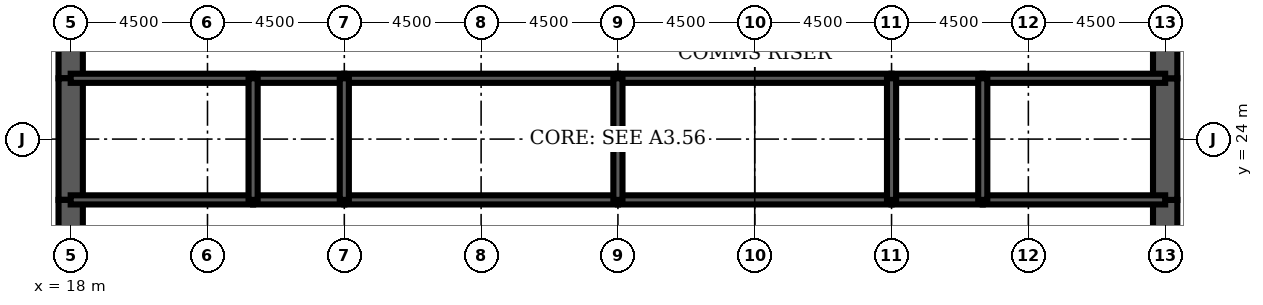
"""IFC4 building model, lengths in metres.
Left out: names, types, materials, properties, quantities, classifications, styles, units other than length and angle.
Written with IfcOpenShell. Run it as: python <this file> out.ifc"""

import sys

from ifc_helpers import new_model, si_unit, direction, frame, frame_2d, origin, place, context, subcontext, project, spatial, rectangle, extrude, element, fill, save


model = new_model("IFC4")
c1 = context("Model", 3, precision=1e-05, world=origin(), true_north=direction((0.0, 1.0)))
c2 = subcontext(c1, "Body", "Model", "MODEL_VIEW")
j1 = project(units=[si_unit("LENGTHUNIT", "METRE"), si_unit("PLANEANGLEUNIT", "RADIAN")], contexts=[c1])
p1 = place(None, origin())
s1 = spatial("IfcSite", under=j1, at=p1, CompositionType="ELEMENT")
p2 = place(p1, origin())
s2 = spatial("IfcBuilding", under=s1, at=p2, CompositionType="ELEMENT")
p3 = place(p2, frame((0.0, 0.0, 240.4)))
s3 = spatial("IfcBuildingStorey", under=s2, at=p3, CompositionType="ELEMENT", Elevation=240.4)
p4 = place(p3, frame((18.0, 28.8, 0.0), z_axis=(0.0, 0.0, 1.0), x_axis=(0.0, -1.0, 0.0)))
e1 = element("IfcWall", 1, at=p4, inside=s3, PredefinedType="SHEAR", context=c2, shape_type="SweptSolid", body=[
    extrude(rectangle(XDim=2.8, YDim=0.8, at=frame_2d((1.4, 0.0))), origin(), (0.0, 0.0, 1.0), 4.2),
])
p5 = place(p4, frame((0.4, 0.0, 0.0)))
e2 = element("IfcOpeningElement", 2, at=p5, cuts=e1, PredefinedType="OPENING", context=c2, shape_type="SweptSolid", body=[
    extrude(rectangle(XDim=1.8, YDim=2.1, at=frame_2d((0.9, 1.05))), frame((0.0, 0.41, 0.0), z_axis=(0.0, -1.0, 0.0), x_axis=(1.0, 0.0, 0.0)), (0.0, 0.0, 1.0), 0.82),
])
p6 = place(p3, frame((18.0, 26.0, 0.0), z_axis=(0.0, 0.0, 1.0), x_axis=(0.0, -1.0, 0.0)))
e3 = element("IfcWall", 3, at=p6, inside=s3, PredefinedType="SHEAR", context=c2, shape_type="SweptSolid", body=[
    extrude(rectangle(XDim=4.0, YDim=0.8, at=frame_2d((2.0, 0.0))), origin(), (0.0, 0.0, 1.0), 4.2),
])
p7 = place(p3, frame((18.0, 22.0, 0.0), z_axis=(0.0, 0.0, 1.0), x_axis=(0.0, -1.0, 0.0)))
e4 = element("IfcWall", 4, at=p7, inside=s3, PredefinedType="SHEAR", context=c2, shape_type="SweptSolid", body=[
    extrude(rectangle(XDim=2.8, YDim=0.8, at=frame_2d((1.4, 0.0))), origin(), (0.0, 0.0, 1.0), 4.2),
])
p8 = place(p7, frame((0.6, 0.0, 0.0)))
e5 = element("IfcOpeningElement", 5, at=p8, cuts=e4, PredefinedType="OPENING", context=c2, shape_type="SweptSolid", body=[
    extrude(rectangle(XDim=1.8, YDim=2.1, at=frame_2d((0.9, 1.05))), frame((0.0, 0.41, 0.0), z_axis=(0.0, -1.0, 0.0), x_axis=(1.0, 0.0, 0.0)), (0.0, 0.0, 1.0), 0.82),
])
p9 = place(p3, frame((54.0, 19.2, 0.0), z_axis=(0.0, 0.0, 1.0), x_axis=(0.0, 1.0, 0.0)))
e6 = element("IfcWall", 6, at=p9, inside=s3, PredefinedType="SHEAR", context=c2, shape_type="SweptSolid", body=[
    extrude(rectangle(XDim=2.8, YDim=0.8, at=frame_2d((1.4, 0.0))), origin(), (0.0, 0.0, 1.0), 4.2),
])
p10 = place(p9, frame((0.4, 0.0, 0.0)))
e7 = element("IfcOpeningElement", 7, at=p10, cuts=e6, PredefinedType="OPENING", context=c2, shape_type="SweptSolid", body=[
    extrude(rectangle(XDim=1.8, YDim=2.1, at=frame_2d((0.9, 1.05))), frame((0.0, 0.41, 0.0), z_axis=(0.0, -1.0, 0.0), x_axis=(1.0, 0.0, 0.0)), (0.0, 0.0, 1.0), 0.82),
])
p11 = place(p3, frame((54.0, 22.0, 0.0), z_axis=(0.0, 0.0, 1.0), x_axis=(0.0, 1.0, 0.0)))
e8 = element("IfcWall", 8, at=p11, inside=s3, PredefinedType="SHEAR", context=c2, shape_type="SweptSolid", body=[
    extrude(rectangle(XDim=4.0, YDim=0.8, at=frame_2d((2.0, 0.0))), origin(), (0.0, 0.0, 1.0), 4.2),
])
p12 = place(p3, frame((54.0, 26.0, 0.0), z_axis=(0.0, 0.0, 1.0), x_axis=(0.0, 1.0, 0.0)))
e9 = element("IfcWall", 9, at=p12, inside=s3, PredefinedType="SHEAR", context=c2, shape_type="SweptSolid", body=[
    extrude(rectangle(XDim=2.8, YDim=0.8, at=frame_2d((1.4, 0.0))), origin(), (0.0, 0.0, 1.0), 4.2),
])
p13 = place(p12, frame((0.6, 0.0, 0.0)))
e10 = element("IfcOpeningElement", 10, at=p13, cuts=e9, PredefinedType="OPENING", context=c2, shape_type="SweptSolid", body=[
    extrude(rectangle(XDim=1.8, YDim=2.1, at=frame_2d((0.9, 1.05))), frame((0.0, 0.41, 0.0), z_axis=(0.0, -1.0, 0.0), x_axis=(1.0, 0.0, 0.0)), (0.0, 0.0, 1.0), 0.82),
])
p14 = place(p3, frame((18.0, 22.0, 0.0), z_axis=(0.0, 0.0, 1.0), x_axis=(1.0, 0.0, 0.0)))
e11 = element("IfcWall", 11, at=p14, inside=s3, PredefinedType="SOLIDWALL", context=c2, shape_type="SweptSolid", body=[
    extrude(rectangle(XDim=6.0, YDim=0.3, at=frame_2d((3.0, 0.0))), origin(), (0.0, 0.0, 1.0), 4.2),
])
p15 = place(p14, frame((4.4, 0.0, 0.0)))
e12 = element("IfcOpeningElement", 12, at=p15, cuts=e11, PredefinedType="OPENING", context=c2, shape_type="SweptSolid", body=[
    extrude(rectangle(XDim=1.0, YDim=2.1, at=frame_2d((0.5, 1.05))), frame((0.0, 0.16, 0.0), z_axis=(0.0, -1.0, 0.0), x_axis=(1.0, 0.0, 0.0)), (0.0, 0.0, 1.0), 0.32),
])
p16 = place(p14, frame((0.65, 0.0, 0.0)))
e13 = element("IfcOpeningElement", 13, at=p16, cuts=e11, PredefinedType="OPENING", context=c2, shape_type="SweptSolid", body=[
    extrude(rectangle(XDim=1.0, YDim=2.1, at=frame_2d((0.5, 1.05))), frame((0.0, 0.16, 0.0), z_axis=(0.0, -1.0, 0.0), x_axis=(1.0, 0.0, 0.0)), (0.0, 0.0, 1.0), 0.32),
])
p17 = place(p3, frame((24.0, 22.0, 0.0), z_axis=(0.0, 0.0, 1.0), x_axis=(1.0, 0.0, 0.0)))
e14 = element("IfcWall", 14, at=p17, inside=s3, PredefinedType="SOLIDWALL", context=c2, shape_type="SweptSolid", body=[
    extrude(rectangle(XDim=3.0, YDim=0.3, at=frame_2d((1.5, 0.0))), origin(), (0.0, 0.0, 1.0), 4.2),
])
p18 = place(p17, frame((1.0, 0.0, 0.0)))
e15 = element("IfcOpeningElement", 15, at=p18, cuts=e14, PredefinedType="OPENING", context=c2, shape_type="SweptSolid", body=[
    extrude(rectangle(XDim=1.0, YDim=2.1, at=frame_2d((0.5, 1.05))), frame((0.0, 0.16, 0.0), z_axis=(0.0, -1.0, 0.0), x_axis=(1.0, 0.0, 0.0)), (0.0, 0.0, 1.0), 0.32),
])
p19 = place(p3, frame((27.0, 22.0, 0.0), z_axis=(0.0, 0.0, 1.0), x_axis=(1.0, 0.0, 0.0)))
e16 = element("IfcWall", 16, at=p19, inside=s3, PredefinedType="SOLIDWALL", context=c2, shape_type="SweptSolid", body=[
    extrude(rectangle(XDim=9.0, YDim=0.3, at=frame_2d((4.5, 0.0))), origin(), (0.0, 0.0, 1.0), 4.2),
])
p20 = place(p19, frame((4.0, 0.0, 0.0)))
e17 = element("IfcOpeningElement", 17, at=p20, cuts=e16, PredefinedType="OPENING", context=c2, shape_type="SweptSolid", body=[
    extrude(rectangle(XDim=1.0, YDim=2.1, at=frame_2d((0.5, 1.05))), frame((0.0, 0.16, 0.0), z_axis=(0.0, -1.0, 0.0), x_axis=(1.0, 0.0, 0.0)), (0.0, 0.0, 1.0), 0.32),
])
p21 = place(p3, frame((36.0, 22.0, 0.0), z_axis=(0.0, 0.0, 1.0), x_axis=(1.0, 0.0, 0.0)))
e18 = element("IfcWall", 18, at=p21, inside=s3, PredefinedType="SOLIDWALL", context=c2, shape_type="SweptSolid", body=[
    extrude(rectangle(XDim=9.0, YDim=0.3, at=frame_2d((4.5, 0.0))), origin(), (0.0, 0.0, 1.0), 4.2),
])
p22 = place(p21, frame((4.0, 0.0, 0.0)))
e19 = element("IfcOpeningElement", 19, at=p22, cuts=e18, PredefinedType="OPENING", context=c2, shape_type="SweptSolid", body=[
    extrude(rectangle(XDim=1.0, YDim=2.1, at=frame_2d((0.5, 1.05))), frame((0.0, 0.16, 0.0), z_axis=(0.0, -1.0, 0.0), x_axis=(1.0, 0.0, 0.0)), (0.0, 0.0, 1.0), 0.32),
])
p23 = place(p3, frame((45.0, 22.0, 0.0), z_axis=(0.0, 0.0, 1.0), x_axis=(1.0, 0.0, 0.0)))
e20 = element("IfcWall", 20, at=p23, inside=s3, PredefinedType="SOLIDWALL", context=c2, shape_type="SweptSolid", body=[
    extrude(rectangle(XDim=3.0, YDim=0.3, at=frame_2d((1.5, 0.0))), origin(), (0.0, 0.0, 1.0), 4.2),
])
p24 = place(p23, frame((1.0, 0.0, 0.0)))
e21 = element("IfcOpeningElement", 21, at=p24, cuts=e20, PredefinedType="OPENING", context=c2, shape_type="SweptSolid", body=[
    extrude(rectangle(XDim=1.0, YDim=2.1, at=frame_2d((0.5, 1.05))), frame((0.0, 0.16, 0.0), z_axis=(0.0, -1.0, 0.0), x_axis=(1.0, 0.0, 0.0)), (0.0, 0.0, 1.0), 0.32),
])
p25 = place(p3, frame((48.0, 22.0, 0.0), z_axis=(0.0, 0.0, 1.0), x_axis=(1.0, 0.0, 0.0)))
e22 = element("IfcWall", 22, at=p25, inside=s3, PredefinedType="SOLIDWALL", context=c2, shape_type="SweptSolid", body=[
    extrude(rectangle(XDim=6.0, YDim=0.3, at=frame_2d((3.0, 0.0))), origin(), (0.0, 0.0, 1.0), 4.2),
])
p26 = place(p25, frame((2.0, 0.0, 0.0)))
e23 = element("IfcOpeningElement", 23, at=p26, cuts=e22, PredefinedType="OPENING", context=c2, shape_type="SweptSolid", body=[
    extrude(rectangle(XDim=1.0, YDim=2.1, at=frame_2d((0.5, 1.05))), frame((0.0, 0.16, 0.0), z_axis=(0.0, -1.0, 0.0), x_axis=(1.0, 0.0, 0.0)), (0.0, 0.0, 1.0), 0.32),
])
p27 = place(p25, frame((4.05, 0.0, 0.0)))
e24 = element("IfcOpeningElement", 24, at=p27, cuts=e22, PredefinedType="OPENING", context=c2, shape_type="SweptSolid", body=[
    extrude(rectangle(XDim=1.0, YDim=2.1, at=frame_2d((0.5, 1.05))), frame((0.0, 0.16, 0.0), z_axis=(0.0, -1.0, 0.0), x_axis=(1.0, 0.0, 0.0)), (0.0, 0.0, 1.0), 0.32),
])
p28 = place(p3, frame((18.0, 26.0, 0.0), z_axis=(0.0, 0.0, 1.0), x_axis=(1.0, 0.0, 0.0)))
e25 = element("IfcWall", 25, at=p28, inside=s3, PredefinedType="SOLIDWALL", context=c2, shape_type="SweptSolid", body=[
    extrude(rectangle(XDim=6.0, YDim=0.3, at=frame_2d((3.0, 0.0))), origin(), (0.0, 0.0, 1.0), 4.2),
])
p29 = place(p3, frame((24.0, 26.0, 0.0), z_axis=(0.0, 0.0, 1.0), x_axis=(1.0, 0.0, 0.0)))
e26 = element("IfcWall", 26, at=p29, inside=s3, PredefinedType="SOLIDWALL", context=c2, shape_type="SweptSolid", body=[
    extrude(rectangle(XDim=3.0, YDim=0.3, at=frame_2d((1.5, 0.0))), origin(), (0.0, 0.0, 1.0), 4.2),
])
for number, where, z_axis, x_axis in (
    (27, (27.0, 26.0, 0.0), (0.0, 0.0, 1.0), (1.0, 0.0, 0.0)),
    (28, (36.0, 26.0, 0.0), (0.0, 0.0, 1.0), (1.0, 0.0, 0.0)),
):
    element("IfcWall", number, at=place(p3, frame(where, z_axis=z_axis, x_axis=x_axis)), inside=s3, PredefinedType="SOLIDWALL", context=c2, shape_type="SweptSolid", body=[
        extrude(rectangle(XDim=9.0, YDim=0.3, at=frame_2d((4.5, 0.0))), origin(), (0.0, 0.0, 1.0), 4.2),
    ])
p30 = place(p3, frame((45.0, 26.0, 0.0), z_axis=(0.0, 0.0, 1.0), x_axis=(1.0, 0.0, 0.0)))
e29 = element("IfcWall", 29, at=p30, inside=s3, PredefinedType="SOLIDWALL", context=c2, shape_type="SweptSolid", body=[
    extrude(rectangle(XDim=3.0, YDim=0.3, at=frame_2d((1.5, 0.0))), origin(), (0.0, 0.0, 1.0), 4.2),
])
p31 = place(p3, frame((48.0, 26.0, 0.0), z_axis=(0.0, 0.0, 1.0), x_axis=(1.0, 0.0, 0.0)))
e30 = element("IfcWall", 30, at=p31, inside=s3, PredefinedType="SOLIDWALL", context=c2, shape_type="SweptSolid", body=[
    extrude(rectangle(XDim=6.0, YDim=0.3, at=frame_2d((3.0, 0.0))), origin(), (0.0, 0.0, 1.0), 4.2),
])
for number, where, z_axis, x_axis in (
    (31, (24.0, 22.0, 0.0), (0.0, 0.0, 1.0), (0.0, 1.0, 0.0)),
    (32, (27.0, 22.0, 0.0), (0.0, 0.0, 1.0), (0.0, 1.0, 0.0)),
    (33, (36.0, 22.0, 0.0), (0.0, 0.0, 1.0), (0.0, 1.0, 0.0)),
    (34, (45.0, 22.0, 0.0), (0.0, 0.0, 1.0), (0.0, 1.0, 0.0)),
    (35, (48.0, 22.0, 0.0), (0.0, 0.0, 1.0), (0.0, 1.0, 0.0)),
):
    element("IfcWall", number, at=place(p3, frame(where, z_axis=z_axis, x_axis=x_axis)), inside=s3, PredefinedType="SOLIDWALL", context=c2, shape_type="SweptSolid", body=[
        extrude(rectangle(XDim=4.0, YDim=0.3, at=frame_2d((2.0, 0.0))), origin(), (0.0, 0.0, 1.0), 4.2),
    ])
p32 = place(p3, frame((39.0, 22.15, 0.0), z_axis=(0.0, 0.0, 1.0), x_axis=(0.0, 1.0, 0.0)))
e36 = element("IfcWall", 36, at=p32, inside=s3, PredefinedType="PARTITIONING", context=c2, shape_type="SweptSolid", body=[
    extrude(rectangle(XDim=3.7, YDim=0.15, at=frame_2d((1.85, 0.0))), origin(), (0.0, 0.0, 1.0), 3.0),
])
p33 = place(p32, frame((2.2, 0.0, 0.0)))
e37 = element("IfcOpeningElement", 37, at=p33, cuts=e36, PredefinedType="OPENING", context=c2, shape_type="SweptSolid", body=[
    extrude(rectangle(XDim=1.0, YDim=2.1, at=frame_2d((0.5, 1.05))), frame((0.0, 0.085, 0.0), z_axis=(0.0, -1.0, 0.0), x_axis=(1.0, 0.0, 0.0)), (0.0, 0.0, 1.0), 0.17),
])
for number, where, z_axis, x_axis in (
    (38, (19.975, 22.15, 0.0), (0.0, 0.0, 1.0), (0.0, 1.0, 0.0)),
    (39, (51.425, 22.15, 0.0), (0.0, 0.0, 1.0), (0.0, 1.0, 0.0)),
):
    element("IfcWall", number, at=place(p3, frame(where, z_axis=z_axis, x_axis=x_axis)), inside=s3, PredefinedType="PARTITIONING", context=c2, shape_type="SweptSolid", body=[
        extrude(rectangle(XDim=3.7, YDim=0.15, at=frame_2d((1.85, 0.0))), origin(), (0.0, 0.0, 1.0), 3.0),
    ])
p34 = place(p33, origin())
e40 = element("IfcDoor", 40, at=p34, inside=s3, OperationType="SINGLE_SWING_RIGHT", PredefinedType="DOOR", context=c2, shape_type="SweptSolid", body=[
    extrude(rectangle(XDim=1.0, YDim=2.1, at=frame_2d((0.5, 1.05))), frame((0.0, 0.025, 0.0), z_axis=(0.0, -1.0, 0.0), x_axis=(1.0, 0.0, 0.0)), (0.0, 0.0, 1.0), 0.05),
])
fill(e37, e40)
p35 = place(p8, origin())
e41 = element("IfcDoor", 41, at=p35, inside=s3, OperationType="SINGLE_SWING_LEFT", PredefinedType="DOOR", context=c2, shape_type="SweptSolid", body=[
    extrude(rectangle(XDim=1.8, YDim=2.1, at=frame_2d((0.9, 1.05))), frame((0.0, 0.4, 0.0), z_axis=(0.0, -1.0, 0.0), x_axis=(1.0, 0.0, 0.0)), (0.0, 0.0, 1.0), 0.8),
])
fill(e5, e41)
p36 = place(p5, origin())
e42 = element("IfcDoor", 42, at=p36, inside=s3, OperationType="SINGLE_SWING_LEFT", PredefinedType="DOOR", context=c2, shape_type="SweptSolid", body=[
    extrude(rectangle(XDim=1.8, YDim=2.1, at=frame_2d((0.9, 1.05))), frame((0.0, 0.4, 0.0), z_axis=(0.0, -1.0, 0.0), x_axis=(1.0, 0.0, 0.0)), (0.0, 0.0, 1.0), 0.8),
])
fill(e2, e42)
p37 = place(p10, origin())
e43 = element("IfcDoor", 43, at=p37, inside=s3, OperationType="SINGLE_SWING_LEFT", PredefinedType="DOOR", context=c2, shape_type="SweptSolid", body=[
    extrude(rectangle(XDim=1.8, YDim=2.1, at=frame_2d((0.9, 1.05))), frame((0.0, 0.4, 0.0), z_axis=(0.0, -1.0, 0.0), x_axis=(1.0, 0.0, 0.0)), (0.0, 0.0, 1.0), 0.8),
])
fill(e7, e43)
p38 = place(p13, origin())
e44 = element("IfcDoor", 44, at=p38, inside=s3, OperationType="SINGLE_SWING_LEFT", PredefinedType="DOOR", context=c2, shape_type="SweptSolid", body=[
    extrude(rectangle(XDim=1.8, YDim=2.1, at=frame_2d((0.9, 1.05))), frame((0.0, 0.4, 0.0), z_axis=(0.0, -1.0, 0.0), x_axis=(1.0, 0.0, 0.0)), (0.0, 0.0, 1.0), 0.8),
])
fill(e10, e44)
p39 = place(p15, origin())
e45 = element("IfcDoor", 45, at=p39, inside=s3, OperationType="SINGLE_SWING_RIGHT", PredefinedType="DOOR", context=c2, shape_type="SweptSolid", body=[
    extrude(rectangle(XDim=1.0, YDim=2.1, at=frame_2d((0.5, 1.05))), frame((0.0, 0.025, 0.0), z_axis=(0.0, -1.0, 0.0), x_axis=(1.0, 0.0, 0.0)), (0.0, 0.0, 1.0), 0.05),
])
fill(e12, e45)
p40 = place(p18, origin())
e46 = element("IfcDoor", 46, at=p40, inside=s3, OperationType="SINGLE_SWING_LEFT", PredefinedType="DOOR", context=c2, shape_type="SweptSolid", body=[
    extrude(rectangle(XDim=1.0, YDim=2.1, at=frame_2d((0.5, 1.05))), frame((0.0, 0.025, 0.0), z_axis=(0.0, -1.0, 0.0), x_axis=(1.0, 0.0, 0.0)), (0.0, 0.0, 1.0), 0.05),
])
fill(e15, e46)
p41 = place(p20, origin())
e47 = element("IfcDoor", 47, at=p41, inside=s3, OperationType="SINGLE_SWING_LEFT", PredefinedType="DOOR", context=c2, shape_type="SweptSolid", body=[
    extrude(rectangle(XDim=1.0, YDim=2.1, at=frame_2d((0.5, 1.05))), frame((0.0, 0.025, 0.0), z_axis=(0.0, -1.0, 0.0), x_axis=(1.0, 0.0, 0.0)), (0.0, 0.0, 1.0), 0.05),
])
fill(e17, e47)
p42 = place(p22, origin())
e48 = element("IfcDoor", 48, at=p42, inside=s3, OperationType="SINGLE_SWING_LEFT", PredefinedType="DOOR", context=c2, shape_type="SweptSolid", body=[
    extrude(rectangle(XDim=1.0, YDim=2.1, at=frame_2d((0.5, 1.05))), frame((0.0, 0.025, 0.0), z_axis=(0.0, -1.0, 0.0), x_axis=(1.0, 0.0, 0.0)), (0.0, 0.0, 1.0), 0.05),
])
fill(e19, e48)
p43 = place(p24, origin())
e49 = element("IfcDoor", 49, at=p43, inside=s3, OperationType="SINGLE_SWING_LEFT", PredefinedType="DOOR", context=c2, shape_type="SweptSolid", body=[
    extrude(rectangle(XDim=1.0, YDim=2.1, at=frame_2d((0.5, 1.05))), frame((0.0, 0.025, 0.0), z_axis=(0.0, -1.0, 0.0), x_axis=(1.0, 0.0, 0.0)), (0.0, 0.0, 1.0), 0.05),
])
fill(e21, e49)
p44 = place(p26, origin())
e50 = element("IfcDoor", 50, at=p44, inside=s3, OperationType="SINGLE_SWING_LEFT", PredefinedType="DOOR", context=c2, shape_type="SweptSolid", body=[
    extrude(rectangle(XDim=1.0, YDim=2.1, at=frame_2d((0.5, 1.05))), frame((0.0, 0.025, 0.0), z_axis=(0.0, -1.0, 0.0), x_axis=(1.0, 0.0, 0.0)), (0.0, 0.0, 1.0), 0.05),
])
fill(e23, e50)
p45 = place(p16, origin())
e51 = element("IfcDoor", 51, at=p45, inside=s3, OperationType="SINGLE_SWING_LEFT", PredefinedType="DOOR", context=c2, shape_type="SweptSolid", body=[
    extrude(rectangle(XDim=1.0, YDim=2.1, at=frame_2d((0.5, 1.05))), frame((0.0, 0.025, 0.0), z_axis=(0.0, -1.0, 0.0), x_axis=(1.0, 0.0, 0.0)), (0.0, 0.0, 1.0), 0.05),
])
fill(e13, e51)
p46 = place(p27, origin())
e52 = element("IfcDoor", 52, at=p46, inside=s3, OperationType="SINGLE_SWING_RIGHT", PredefinedType="DOOR", context=c2, shape_type="SweptSolid", body=[
    extrude(rectangle(XDim=1.0, YDim=2.1, at=frame_2d((0.5, 1.05))), frame((0.0, 0.025, 0.0), z_axis=(0.0, -1.0, 0.0), x_axis=(1.0, 0.0, 0.0)), (0.0, 0.0, 1.0), 0.05),
])
fill(e24, e52)
save(model, sys.argv[1])
